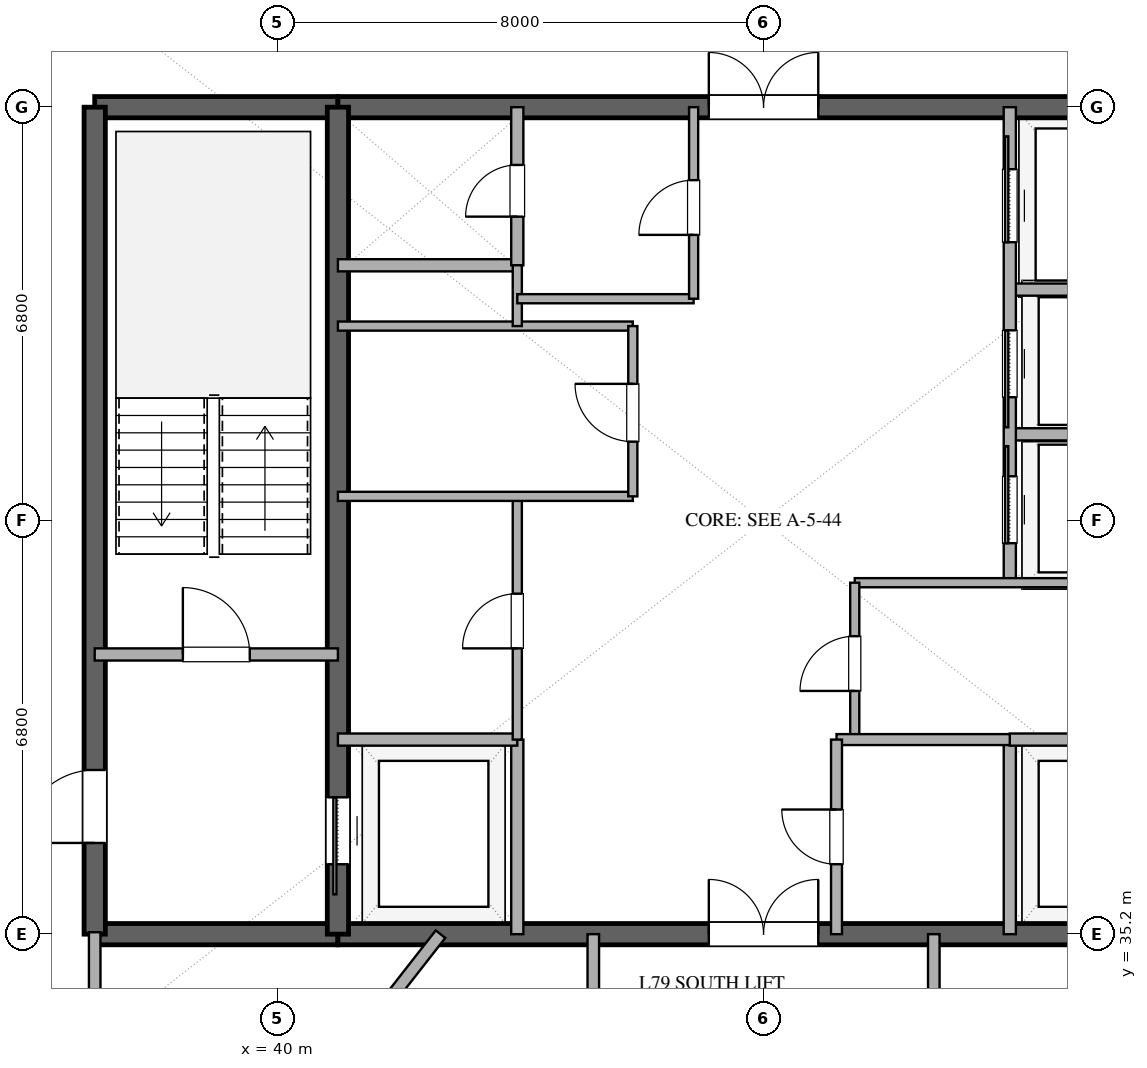
"""IFC4 building model, lengths in metres.
Left out: names, types, materials, properties, quantities, classifications, styles, units other than length and angle.
Written with IfcOpenShell. Run it as: python <this file> out.ifc"""

import sys

from ifc_helpers import new_model, si_unit, direction, frame, frame_2d, origin, place, context, subcontext, project, spatial, rectangle, extrude, element, fill, save


model = new_model("IFC4")
c1 = context("Model", 3, precision=1e-05, world=origin(), true_north=direction((0.0, 1.0)))
c2 = subcontext(c1, "Body", "Model", "MODEL_VIEW")
j1 = project(units=[si_unit("LENGTHUNIT", "METRE"), si_unit("PLANEANGLEUNIT", "RADIAN")], contexts=[c1])
p1 = place(None, origin())
s1 = spatial("IfcSite", under=j1, at=p1, CompositionType="ELEMENT")
p2 = place(p1, origin())
s2 = spatial("IfcBuilding", under=s1, at=p2, CompositionType="ELEMENT")
p3 = place(p2, frame((0.0, 0.0, 305.4)))
s3 = spatial("IfcBuildingStorey", under=s2, at=p3, CompositionType="ELEMENT", Elevation=305.4)
p4 = place(p3, frame((37.0, 35.2, 0.0), z_axis=(0.0, 0.0, 1.0), x_axis=(1.0, 0.0, 0.0)))
e1 = element("IfcWall", 1, at=p4, inside=s3, PredefinedType="SHEAR", context=c2, shape_type="SweptSolid", body=[
    extrude(rectangle(XDim=4.0, YDim=0.35, at=frame_2d((2.0, 0.0))), origin(), (0.0, 0.0, 1.0), 3.37),
])
p5 = place(p3, frame((41.0, 35.2, 0.0), z_axis=(0.0, 0.0, 1.0), x_axis=(1.0, 0.0, 0.0)))
e2 = element("IfcWall", 2, at=p5, inside=s3, PredefinedType="SHEAR", context=c2, shape_type="SweptSolid", body=[
    extrude(rectangle(XDim=14.0, YDim=0.35, at=frame_2d((7.0, 0.0))), origin(), (0.0, 0.0, 1.0), 3.37),
])
p6 = place(p5, frame((6.1, 0.0, 0.0)))
e3 = element("IfcOpeningElement", 3, at=p6, cuts=e2, PredefinedType="OPENING", context=c2, shape_type="SweptSolid", body=[
    extrude(rectangle(XDim=1.8, YDim=2.25, at=frame_2d((0.9, 1.125))), frame((0.0, 0.185, 0.0), z_axis=(0.0, -1.0, 0.0), x_axis=(1.0, 0.0, 0.0)), (0.0, 0.0, 1.0), 0.37),
])
p7 = place(p3, frame((37.0, 48.8, 0.0), z_axis=(0.0, 0.0, 1.0), x_axis=(1.0, 0.0, 0.0)))
e4 = element("IfcWall", 4, at=p7, inside=s3, PredefinedType="SHEAR", context=c2, shape_type="SweptSolid", body=[
    extrude(rectangle(XDim=4.0, YDim=0.35, at=frame_2d((2.0, 0.0))), origin(), (0.0, 0.0, 1.0), 3.37),
])
p8 = place(p3, frame((41.0, 48.8, 0.0), z_axis=(0.0, 0.0, 1.0), x_axis=(1.0, 0.0, 0.0)))
e5 = element("IfcWall", 5, at=p8, inside=s3, PredefinedType="SHEAR", context=c2, shape_type="SweptSolid", body=[
    extrude(rectangle(XDim=14.0, YDim=0.35, at=frame_2d((7.0, 0.0))), origin(), (0.0, 0.0, 1.0), 3.37),
])
p9 = place(p8, frame((6.1, 0.0, 0.0)))
e6 = element("IfcOpeningElement", 6, at=p9, cuts=e5, PredefinedType="OPENING", context=c2, shape_type="SweptSolid", body=[
    extrude(rectangle(XDim=1.8, YDim=2.25, at=frame_2d((0.9, 1.125))), frame((0.0, 0.185, 0.0), z_axis=(0.0, -1.0, 0.0), x_axis=(1.0, 0.0, 0.0)), (0.0, 0.0, 1.0), 0.37),
])
p10 = place(p3, frame((37.0, 35.2, 0.0), z_axis=(0.0, 0.0, 1.0), x_axis=(0.0, 1.0, 0.0)))
e7 = element("IfcWall", 7, at=p10, inside=s3, PredefinedType="SHEAR", context=c2, shape_type="SweptSolid", body=[
    extrude(rectangle(XDim=13.6, YDim=0.35, at=frame_2d((6.8, 0.0))), origin(), (0.0, 0.0, 1.0), 3.37),
])
p11 = place(p10, frame((1.5, 0.0, 0.0)))
e8 = element("IfcOpeningElement", 8, at=p11, cuts=e7, PredefinedType="OPENING", context=c2, shape_type="SweptSolid", body=[
    extrude(rectangle(XDim=1.2, YDim=2.15, at=frame_2d((0.6, 1.075))), frame((0.0, 0.185, 0.0), z_axis=(0.0, -1.0, 0.0), x_axis=(1.0, 0.0, 0.0)), (0.0, 0.0, 1.0), 0.37),
])
p12 = place(p3, frame((41.0, 35.2, 0.0), z_axis=(0.0, 0.0, 1.0), x_axis=(0.0, 1.0, 0.0)))
e9 = element("IfcWall", 9, at=p12, inside=s3, PredefinedType="SHEAR", context=c2, shape_type="SweptSolid", body=[
    extrude(rectangle(XDim=13.6, YDim=0.35, at=frame_2d((6.8, 0.0))), origin(), (0.0, 0.0, 1.0), 3.37),
])
p13 = place(p12, frame((1.15, 0.0, 0.0)))
e10 = element("IfcOpeningElement", 10, at=p13, cuts=e9, PredefinedType="OPENING", context=c2, shape_type="SweptSolid", body=[
    extrude(rectangle(XDim=1.1, YDim=2.2, at=frame_2d((0.55, 1.1))), frame((0.0, 0.185, 0.0), z_axis=(0.0, -1.0, 0.0), x_axis=(1.0, 0.0, 0.0)), (0.0, 0.0, 1.0), 0.37),
])
p14 = place(p3, frame((37.0, 39.8, 0.0), z_axis=(0.0, 0.0, 1.0), x_axis=(1.0, 0.0, 0.0)))
e11 = element("IfcWall", 11, at=p14, inside=s3, PredefinedType="SOLIDWALL", context=c2, shape_type="SweptSolid", body=[
    extrude(rectangle(XDim=4.0, YDim=0.2, at=frame_2d((2.0, 0.0))), origin(), (0.0, 0.0, 1.0), 2.73),
])
p15 = place(p14, frame((1.45, 0.0, 0.0)))
e12 = element("IfcOpeningElement", 12, at=p15, cuts=e11, PredefinedType="OPENING", context=c2, shape_type="SweptSolid", body=[
    extrude(rectangle(XDim=1.1, YDim=2.15, at=frame_2d((0.55, 1.075))), frame((0.0, 0.11, 0.0), z_axis=(0.0, -1.0, 0.0), x_axis=(1.0, 0.0, 0.0)), (0.0, 0.0, 1.0), 0.22),
])
p16 = place(p3, frame((43.95, 35.2, 0.0), z_axis=(0.0, 0.0, 1.0), x_axis=(0.0, 1.0, 0.0)))
e13 = element("IfcWall", 13, at=p16, inside=s3, PredefinedType="SOLIDWALL", context=c2, shape_type="SweptSolid", body=[
    extrude(rectangle(XDim=3.2, YDim=0.2, at=frame_2d((1.6, 0.0))), origin(), (0.0, 0.0, 1.0), 2.73),
])
p17 = place(p3, frame((41.0, 38.4, 0.0), z_axis=(0.0, 0.0, 1.0), x_axis=(1.0, 0.0, 0.0)))
e14 = element("IfcWall", 14, at=p17, inside=s3, PredefinedType="SOLIDWALL", context=c2, shape_type="SweptSolid", body=[
    extrude(rectangle(XDim=2.95, YDim=0.2, at=frame_2d((1.475, 0.0))), origin(), (0.0, 0.0, 1.0), 2.73),
])
p18 = place(p3, frame((52.05, 35.2, 0.0), z_axis=(0.0, 0.0, 1.0), x_axis=(0.0, 1.0, 0.0)))
e15 = element("IfcWall", 15, at=p18, inside=s3, PredefinedType="SOLIDWALL", context=c2, shape_type="SweptSolid", body=[
    extrude(rectangle(XDim=3.2, YDim=0.2, at=frame_2d((1.6, 0.0))), origin(), (0.0, 0.0, 1.0), 2.73),
])
for number, where, z_axis, x_axis in (
    (16, (52.05, 38.4, 0.0), (0.0, 0.0, 1.0), (1.0, 0.0, 0.0)),
    (17, (41.0, 46.2, 0.0), (0.0, 0.0, 1.0), (1.0, 0.0, 0.0)),
):
    element("IfcWall", number, at=place(p3, frame(where, z_axis=z_axis, x_axis=x_axis)), inside=s3, PredefinedType="SOLIDWALL", context=c2, shape_type="SweptSolid", body=[
        extrude(rectangle(XDim=2.95, YDim=0.2, at=frame_2d((1.475, 0.0))), origin(), (0.0, 0.0, 1.0), 2.73),
    ])
p19 = place(p3, frame((43.95, 46.2, 0.0), z_axis=(0.0, 0.0, 1.0), x_axis=(0.0, 1.0, 0.0)))
e18 = element("IfcWall", 18, at=p19, inside=s3, PredefinedType="SOLIDWALL", context=c2, shape_type="SweptSolid", body=[
    extrude(rectangle(XDim=2.6, YDim=0.2, at=frame_2d((1.3, 0.0))), origin(), (0.0, 0.0, 1.0), 2.73),
])
p20 = place(p19, frame((0.8, 0.0, 0.0)))
e19 = element("IfcOpeningElement", 19, at=p20, cuts=e18, PredefinedType="OPENING", context=c2, shape_type="SweptSolid", body=[
    extrude(rectangle(XDim=0.85, YDim=2.15, at=frame_2d((0.425, 1.075))), frame((0.0, 0.11, 0.0), z_axis=(0.0, -1.0, 0.0), x_axis=(1.0, 0.0, 0.0)), (0.0, 0.0, 1.0), 0.22),
])
p21 = place(p3, frame((43.95, 38.4, 0.0), z_axis=(0.0, 0.0, 1.0), x_axis=(0.0, 1.0, 0.0)))
e20 = element("IfcWall", 20, at=p21, inside=s3, PredefinedType="PARTITIONING", context=c2, shape_type="SweptSolid", body=[
    extrude(rectangle(XDim=4.0, YDim=0.15, at=frame_2d((2.0, 0.0))), origin(), (0.0, 0.0, 1.0), 2.73),
])
p22 = place(p21, frame((1.5, 0.0, 0.0)))
e21 = element("IfcOpeningElement", 21, at=p22, cuts=e20, PredefinedType="OPENING", context=c2, shape_type="SweptSolid", body=[
    extrude(rectangle(XDim=0.9, YDim=2.15, at=frame_2d((0.45, 1.075))), frame((0.0, 0.085, 0.0), z_axis=(0.0, -1.0, 0.0), x_axis=(1.0, 0.0, 0.0)), (0.0, 0.0, 1.0), 0.17),
])
for number, where, z_axis, x_axis in (
    (22, (41.0, 42.4, 0.0), (0.0, 0.0, 1.0), (1.0, 0.0, 0.0)),
    (23, (41.0, 45.2, 0.0), (0.0, 0.0, 1.0), (1.0, 0.0, 0.0)),
):
    element("IfcWall", number, at=place(p3, frame(where, z_axis=z_axis, x_axis=x_axis)), inside=s3, PredefinedType="PARTITIONING", context=c2, shape_type="SweptSolid", body=[
        extrude(rectangle(XDim=4.85, YDim=0.15, at=frame_2d((2.425, 0.0))), origin(), (0.0, 0.0, 1.0), 2.73),
    ])
p23 = place(p3, frame((43.95, 45.2, 0.0), z_axis=(0.0, 0.0, 1.0), x_axis=(0.0, 1.0, 0.0)))
e24 = element("IfcWall", 24, at=p23, inside=s3, PredefinedType="PARTITIONING", context=c2, shape_type="SweptSolid", body=[
    extrude(rectangle(XDim=1.0, YDim=0.15, at=frame_2d((0.5, 0.0))), origin(), (0.0, 0.0, 1.0), 2.73),
])
p24 = place(p3, frame((45.85, 42.4, 0.0), z_axis=(0.0, 0.0, 1.0), x_axis=(0.0, 1.0, 0.0)))
e25 = element("IfcWall", 25, at=p24, inside=s3, PredefinedType="PARTITIONING", context=c2, shape_type="SweptSolid", body=[
    extrude(rectangle(XDim=2.8, YDim=0.15, at=frame_2d((1.4, 0.0))), origin(), (0.0, 0.0, 1.0), 2.73),
])
p25 = place(p24, frame((0.9, 0.0, 0.0)))
e26 = element("IfcOpeningElement", 26, at=p25, cuts=e25, PredefinedType="OPENING", context=c2, shape_type="SweptSolid", body=[
    extrude(rectangle(XDim=0.95, YDim=2.15, at=frame_2d((0.475, 1.075))), frame((0.0, 0.085, 0.0), z_axis=(0.0, -1.0, 0.0), x_axis=(1.0, 0.0, 0.0)), (0.0, 0.0, 1.0), 0.17),
])
for number, where, z_axis, x_axis in (
    (27, (52.05, 43.42, 0.0), (0.0, 0.0, 1.0), (1.0, 0.0, 0.0)),
    (28, (52.05, 45.8, 0.0), (0.0, 0.0, 1.0), (1.0, 0.0, 0.0)),
):
    element("IfcWall", number, at=place(p3, frame(where, z_axis=z_axis, x_axis=x_axis)), inside=s3, PredefinedType="SOLIDWALL", context=c2, shape_type="SweptSolid", body=[
        extrude(rectangle(XDim=2.95, YDim=0.2, at=frame_2d((1.475, 0.0))), origin(), (0.0, 0.0, 1.0), 2.73),
    ])
p26 = place(p3, frame((52.05, 40.98, 0.0), z_axis=(0.0, 0.0, 1.0), x_axis=(0.0, 1.0, 0.0)))
e29 = element("IfcWall", 29, at=p26, inside=s3, PredefinedType="SOLIDWALL", context=c2, shape_type="SweptSolid", body=[
    extrude(rectangle(XDim=7.82, YDim=0.2, at=frame_2d((3.91, 0.0))), origin(), (0.0, 0.0, 1.0), 2.73),
])
p27 = place(p26, frame((0.65, 0.0, 0.0)))
e30 = element("IfcOpeningElement", 30, at=p27, cuts=e29, PredefinedType="OPENING", context=c2, shape_type="SweptSolid", body=[
    extrude(rectangle(XDim=1.1, YDim=2.2, at=frame_2d((0.55, 1.1))), frame((0.0, 0.11, 0.0), z_axis=(0.0, -1.0, 0.0), x_axis=(1.0, 0.0, 0.0)), (0.0, 0.0, 1.0), 0.22),
])
p28 = place(p26, frame((3.05, 0.0, 0.0)))
e31 = element("IfcOpeningElement", 31, at=p28, cuts=e29, PredefinedType="OPENING", context=c2, shape_type="SweptSolid", body=[
    extrude(rectangle(XDim=1.1, YDim=2.2, at=frame_2d((0.55, 1.1))), frame((0.0, 0.11, 0.0), z_axis=(0.0, -1.0, 0.0), x_axis=(1.0, 0.0, 0.0)), (0.0, 0.0, 1.0), 0.22),
])
p29 = place(p26, frame((5.6, 0.0, 0.0)))
e32 = element("IfcOpeningElement", 32, at=p29, cuts=e29, PredefinedType="OPENING", context=c2, shape_type="SweptSolid", body=[
    extrude(rectangle(XDim=1.2, YDim=2.2, at=frame_2d((0.6, 1.1))), frame((0.0, 0.11, 0.0), z_axis=(0.0, -1.0, 0.0), x_axis=(1.0, 0.0, 0.0)), (0.0, 0.0, 1.0), 0.22),
])
p30 = place(p3, frame((49.5, 40.98, 0.0), z_axis=(0.0, 0.0, 1.0), x_axis=(1.0, 0.0, 0.0)))
e33 = element("IfcWall", 33, at=p30, inside=s3, PredefinedType="PARTITIONING", context=c2, shape_type="SweptSolid", body=[
    extrude(rectangle(XDim=5.5, YDim=0.15, at=frame_2d((2.75, 0.0))), origin(), (0.0, 0.0, 1.0), 2.73),
])
p31 = place(p3, frame((49.5, 38.4, 0.0), z_axis=(0.0, 0.0, 1.0), x_axis=(0.0, 1.0, 0.0)))
e34 = element("IfcWall", 34, at=p31, inside=s3, PredefinedType="PARTITIONING", context=c2, shape_type="SweptSolid", body=[
    extrude(rectangle(XDim=2.58, YDim=0.15, at=frame_2d((1.29, 0.0))), origin(), (0.0, 0.0, 1.0), 2.73),
])
p32 = place(p31, frame((0.8, 0.0, 0.0)))
e35 = element("IfcOpeningElement", 35, at=p32, cuts=e34, PredefinedType="OPENING", context=c2, shape_type="SweptSolid", body=[
    extrude(rectangle(XDim=0.9, YDim=2.15, at=frame_2d((0.45, 1.075))), frame((0.0, 0.085, 0.0), z_axis=(0.0, -1.0, 0.0), x_axis=(1.0, 0.0, 0.0)), (0.0, 0.0, 1.0), 0.17),
])
p33 = place(p3, frame((43.95, 45.65, 0.0), z_axis=(0.0, 0.0, 1.0), x_axis=(1.0, 0.0, 0.0)))
e36 = element("IfcWall", 36, at=p33, inside=s3, PredefinedType="PARTITIONING", context=c2, shape_type="SweptSolid", body=[
    extrude(rectangle(XDim=2.9, YDim=0.15, at=frame_2d((1.45, 0.0))), origin(), (0.0, 0.0, 1.0), 2.73),
])
p34 = place(p3, frame((46.85, 45.65, 0.0), z_axis=(0.0, 0.0, 1.0), x_axis=(0.0, 1.0, 0.0)))
e37 = element("IfcWall", 37, at=p34, inside=s3, PredefinedType="PARTITIONING", context=c2, shape_type="SweptSolid", body=[
    extrude(rectangle(XDim=3.15, YDim=0.15, at=frame_2d((1.575, 0.0))), origin(), (0.0, 0.0, 1.0), 2.73),
])
p35 = place(p34, frame((1.05, 0.0, 0.0)))
e38 = element("IfcOpeningElement", 38, at=p35, cuts=e37, PredefinedType="OPENING", context=c2, shape_type="SweptSolid", body=[
    extrude(rectangle(XDim=0.9, YDim=2.15, at=frame_2d((0.45, 1.075))), frame((0.0, 0.085, 0.0), z_axis=(0.0, -1.0, 0.0), x_axis=(1.0, 0.0, 0.0)), (0.0, 0.0, 1.0), 0.17),
])
p36 = place(p3, frame((49.2, 38.4, 0.0), z_axis=(0.0, 0.0, 1.0), x_axis=(1.0, 0.0, 0.0)))
e39 = element("IfcWall", 39, at=p36, inside=s3, PredefinedType="PLUMBINGWALL", context=c2, shape_type="SweptSolid", body=[
    extrude(rectangle(XDim=2.85, YDim=0.18, at=frame_2d((1.425, 0.0))), origin(), (0.0, 0.0, 1.0), 2.73),
])
p37 = place(p3, frame((49.2, 35.2, 0.0), z_axis=(0.0, 0.0, 1.0), x_axis=(0.0, 1.0, 0.0)))
e40 = element("IfcWall", 40, at=p37, inside=s3, PredefinedType="PLUMBINGWALL", context=c2, shape_type="SweptSolid", body=[
    extrude(rectangle(XDim=3.2, YDim=0.18, at=frame_2d((1.6, 0.0))), origin(), (0.0, 0.0, 1.0), 2.73),
])
p38 = place(p37, frame((1.15, 0.0, 0.0)))
e41 = element("IfcOpeningElement", 41, at=p38, cuts=e40, PredefinedType="OPENING", context=c2, shape_type="SweptSolid", body=[
    extrude(rectangle(XDim=0.9, YDim=2.1, at=frame_2d((0.45, 1.05))), frame((0.0, 0.1, 0.0), z_axis=(0.0, -1.0, 0.0), x_axis=(1.0, 0.0, 0.0)), (0.0, 0.0, 1.0), 0.2),
])
p39 = place(p3, frame((42.687, 35.2, 0.0), z_axis=(0.0, 0.0, 1.0), x_axis=(-0.615663811723, -0.788008928208, 0.0)))
e42 = element("IfcWall", 42, at=p39, inside=s3, PredefinedType="PARTITIONING", context=c2, shape_type="SweptSolid", body=[
    extrude(rectangle(XDim=12.701, YDim=0.2, at=frame_2d((6.351, 0.0))), origin(), (0.0, 0.0, 1.0), 2.73),
])
for number, where, z_axis, x_axis in (
    (43, (50.8, 35.2, 0.0), (0.0, 0.0, 1.0), (0.0, -1.0, 0.0)),
    (44, (45.2, 33.1, 0.0), (0.0, 0.0, 1.0), (0.0, 1.0, 0.0)),
):
    element("IfcWall", number, at=place(p3, frame(where, z_axis=z_axis, x_axis=x_axis)), inside=s3, PredefinedType="PARTITIONING", context=c2, shape_type="SweptSolid", body=[
        extrude(rectangle(XDim=2.1, YDim=0.19, at=frame_2d((1.05, 0.0))), origin(), (0.0, 0.0, 1.0), 2.73),
    ])
p40 = place(p3, frame((37.0, 35.232, 0.0), z_axis=(0.0, 0.0, 1.0), x_axis=(0.0, -1.0, 0.0)))
e45 = element("IfcWall", 45, at=p40, inside=s3, PredefinedType="PARTITIONING", context=c2, shape_type="SweptSolid", body=[
    extrude(rectangle(XDim=1.232, YDim=0.19, at=frame_2d((0.616, 0.0))), origin(), (0.0, 0.0, 1.0), 2.73),
])
p41 = place(p13, origin())
e46 = element("IfcDoor", 46, at=p41, inside=s3, OperationType="SLIDING_TO_LEFT", PredefinedType="DOOR", context=c2, shape_type="SweptSolid", body=[
    extrude(rectangle(XDim=1.1, YDim=2.2, at=frame_2d((0.55, 1.1))), frame((0.0, 0.025, 0.0), z_axis=(0.0, -1.0, 0.0), x_axis=(1.0, 0.0, 0.0)), (0.0, 0.0, 1.0), 0.05),
])
fill(e10, e46)
p42 = place(p11, origin())
e47 = element("IfcDoor", 47, at=p42, inside=s3, OperationType="SINGLE_SWING_LEFT", PredefinedType="DOOR", context=c2, shape_type="SweptSolid", body=[
    extrude(rectangle(XDim=1.2, YDim=2.15, at=frame_2d((0.6, 1.075))), frame((0.0, 0.025, 0.0), z_axis=(0.0, -1.0, 0.0), x_axis=(1.0, 0.0, 0.0)), (0.0, 0.0, 1.0), 0.05),
])
fill(e8, e47)
p43 = place(p6, origin())
e48 = element("IfcDoor", 48, at=p43, inside=s3, OperationType="DOUBLE_DOOR_SINGLE_SWING", PredefinedType="DOOR", context=c2, shape_type="SweptSolid", body=[
    extrude(rectangle(XDim=1.8, YDim=2.25, at=frame_2d((0.9, 1.125))), frame((0.0, 0.025, 0.0), z_axis=(0.0, -1.0, 0.0), x_axis=(1.0, 0.0, 0.0)), (0.0, 0.0, 1.0), 0.05),
])
fill(e3, e48)
p44 = place(p9, origin())
e49 = element("IfcDoor", 49, at=p44, inside=s3, OperationType="DOUBLE_DOOR_SINGLE_SWING", PredefinedType="DOOR", context=c2, shape_type="SweptSolid", body=[
    extrude(rectangle(XDim=1.8, YDim=2.25, at=frame_2d((0.9, 1.125))), frame((0.0, 0.025, 0.0), z_axis=(0.0, -1.0, 0.0), x_axis=(1.0, 0.0, 0.0)), (0.0, 0.0, 1.0), 0.05),
])
fill(e6, e49)
p45 = place(p15, origin())
e50 = element("IfcDoor", 50, at=p45, inside=s3, OperationType="SINGLE_SWING_LEFT", PredefinedType="DOOR", context=c2, shape_type="SweptSolid", body=[
    extrude(rectangle(XDim=1.1, YDim=2.15, at=frame_2d((0.55, 1.075))), frame((0.0, 0.025, 0.0), z_axis=(0.0, -1.0, 0.0), x_axis=(1.0, 0.0, 0.0)), (0.0, 0.0, 1.0), 0.05),
])
fill(e12, e50)
p46 = place(p20, origin())
e51 = element("IfcDoor", 51, at=p46, inside=s3, OperationType="SINGLE_SWING_LEFT", PredefinedType="DOOR", context=c2, shape_type="SweptSolid", body=[
    extrude(rectangle(XDim=0.85, YDim=2.15, at=frame_2d((0.425, 1.075))), frame((0.0, 0.025, 0.0), z_axis=(0.0, -1.0, 0.0), x_axis=(1.0, 0.0, 0.0)), (0.0, 0.0, 1.0), 0.05),
])
fill(e19, e51)
p47 = place(p22, origin())
e52 = element("IfcDoor", 52, at=p47, inside=s3, OperationType="SINGLE_SWING_LEFT", PredefinedType="DOOR", context=c2, shape_type="SweptSolid", body=[
    extrude(rectangle(XDim=0.9, YDim=2.15, at=frame_2d((0.45, 1.075))), frame((0.0, 0.025, 0.0), z_axis=(0.0, -1.0, 0.0), x_axis=(1.0, 0.0, 0.0)), (0.0, 0.0, 1.0), 0.05),
])
fill(e21, e52)
p48 = place(p25, origin())
e53 = element("IfcDoor", 53, at=p48, inside=s3, OperationType="SINGLE_SWING_RIGHT", PredefinedType="DOOR", context=c2, shape_type="SweptSolid", body=[
    extrude(rectangle(XDim=0.95, YDim=2.15, at=frame_2d((0.475, 1.075))), frame((0.0, 0.025, 0.0), z_axis=(0.0, -1.0, 0.0), x_axis=(1.0, 0.0, 0.0)), (0.0, 0.0, 1.0), 0.05),
])
fill(e26, e53)
p49 = place(p27, origin())
e54 = element("IfcDoor", 54, at=p49, inside=s3, OperationType="SLIDING_TO_RIGHT", PredefinedType="DOOR", context=c2, shape_type="SweptSolid", body=[
    extrude(rectangle(XDim=1.1, YDim=2.2, at=frame_2d((0.55, 1.1))), frame((0.0, 0.025, 0.0), z_axis=(0.0, -1.0, 0.0), x_axis=(1.0, 0.0, 0.0)), (0.0, 0.0, 1.0), 0.05),
])
fill(e30, e54)
p50 = place(p28, origin())
e55 = element("IfcDoor", 55, at=p50, inside=s3, OperationType="SLIDING_TO_LEFT", PredefinedType="DOOR", context=c2, shape_type="SweptSolid", body=[
    extrude(rectangle(XDim=1.1, YDim=2.2, at=frame_2d((0.55, 1.1))), frame((0.0, 0.025, 0.0), z_axis=(0.0, -1.0, 0.0), x_axis=(1.0, 0.0, 0.0)), (0.0, 0.0, 1.0), 0.05),
])
fill(e31, e55)
p51 = place(p29, origin())
e56 = element("IfcDoor", 56, at=p51, inside=s3, OperationType="SLIDING_TO_RIGHT", PredefinedType="DOOR", context=c2, shape_type="SweptSolid", body=[
    extrude(rectangle(XDim=1.2, YDim=2.2, at=frame_2d((0.6, 1.1))), frame((0.0, 0.025, 0.0), z_axis=(0.0, -1.0, 0.0), x_axis=(1.0, 0.0, 0.0)), (0.0, 0.0, 1.0), 0.05),
])
fill(e32, e56)
p52 = place(p32, origin())
e57 = element("IfcDoor", 57, at=p52, inside=s3, OperationType="SINGLE_SWING_LEFT", PredefinedType="DOOR", context=c2, shape_type="SweptSolid", body=[
    extrude(rectangle(XDim=0.9, YDim=2.15, at=frame_2d((0.45, 1.075))), frame((0.0, 0.025, 0.0), z_axis=(0.0, -1.0, 0.0), x_axis=(1.0, 0.0, 0.0)), (0.0, 0.0, 1.0), 0.05),
])
fill(e35, e57)
p53 = place(p35, origin())
e58 = element("IfcDoor", 58, at=p53, inside=s3, OperationType="SINGLE_SWING_LEFT", PredefinedType="DOOR", context=c2, shape_type="SweptSolid", body=[
    extrude(rectangle(XDim=0.9, YDim=2.15, at=frame_2d((0.45, 1.075))), frame((0.0, 0.025, 0.0), z_axis=(0.0, -1.0, 0.0), x_axis=(1.0, 0.0, 0.0)), (0.0, 0.0, 1.0), 0.05),
])
fill(e38, e58)
p54 = place(p38, origin())
e59 = element("IfcDoor", 59, at=p54, inside=s3, OperationType="SINGLE_SWING_RIGHT", PredefinedType="DOOR", context=c2, shape_type="SweptSolid", body=[
    extrude(rectangle(XDim=0.9, YDim=2.1, at=frame_2d((0.45, 1.05))), frame((0.0, 0.025, 0.0), z_axis=(0.0, -1.0, 0.0), x_axis=(1.0, 0.0, 0.0)), (0.0, 0.0, 1.0), 0.05),
])
fill(e41, e59)
save(model, sys.argv[1])
